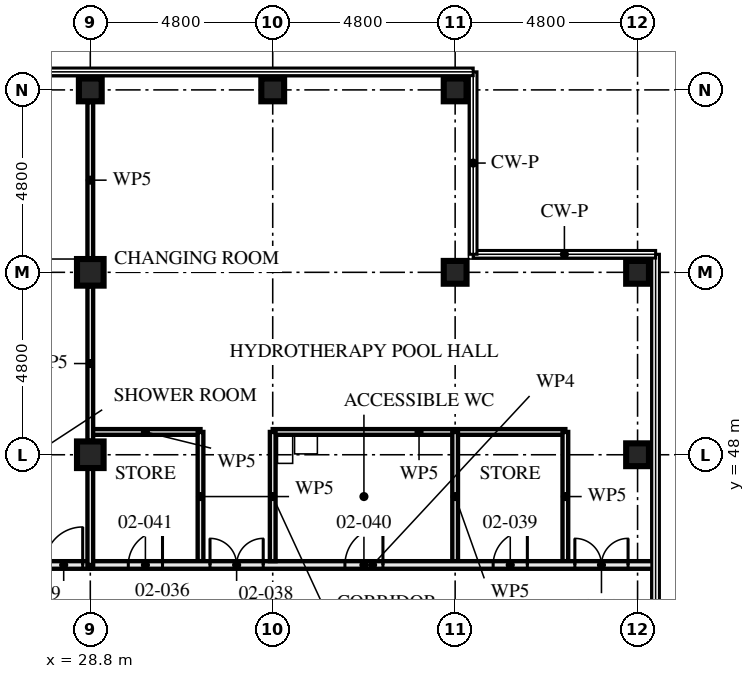
"""IFC4 building model, lengths in metres.
Left out: names, types, materials, properties, quantities, classifications, styles, units other than length and angle.
Written with IfcOpenShell. Run it as: python <this file> out.ifc"""

import sys

from ifc_helpers import new_model, si_unit, direction, frame, frame_2d, origin, origin_2d, place, context, subcontext, project, spatial, rectangle, hollow_rectangle, extrude, element, fill, save


model = new_model("IFC4")
c1 = context("Model", 3, precision=1e-05, world=origin(), true_north=direction((0.0, 1.0)))
c2 = subcontext(c1, "Body", "Model", "MODEL_VIEW")
j1 = project(units=[si_unit("LENGTHUNIT", "METRE"), si_unit("PLANEANGLEUNIT", "RADIAN")], contexts=[c1])
p1 = place(None, origin())
s1 = spatial("IfcSite", under=j1, at=p1, CompositionType="ELEMENT")
p2 = place(p1, origin())
s2 = spatial("IfcBuilding", under=s1, at=p2, CompositionType="ELEMENT")
p3 = place(p2, frame((0.0, 0.0, 9.0)))
s3 = spatial("IfcBuildingStorey", under=s2, at=p3, CompositionType="ELEMENT", Elevation=9.0)
for number, where, z_axis, x_axis in (
    (1, (28.8, 48.0, 0.0), (0.0, 0.0, 1.0), (1.0, 0.0, 0.0)),
    (2, (28.8, 52.8, 0.0), (0.0, 0.0, 1.0), (1.0, 0.0, 0.0)),
):
    element("IfcColumn", number, at=place(p3, frame(where, z_axis=z_axis, x_axis=x_axis)), inside=s3, PredefinedType="COLUMN", context=c2, shape_type="SweptSolid", body=[
        extrude(hollow_rectangle(XDim=0.7, YDim=0.7, WallThickness=0.06, at=origin_2d()), origin(), (0.0, 0.0, 1.0), 4.5),
    ])
for number, where, z_axis, x_axis in (
    (3, (28.8, 57.6, 0.0), (0.0, 0.0, 1.0), (0.0, 1.0, 0.0)),
    (4, (33.6, 57.6, 0.0), (0.0, 0.0, 1.0), (0.0, 1.0, 0.0)),
):
    element("IfcColumn", number, at=place(p3, frame(where, z_axis=z_axis, x_axis=x_axis)), inside=s3, PredefinedType="COLUMN", context=c2, shape_type="SweptSolid", body=[
        extrude(hollow_rectangle(XDim=0.6, YDim=0.6, WallThickness=0.08, at=origin_2d()), origin(), (0.0, 0.0, 1.0), 4.5),
    ])
for number, where, z_axis, x_axis in (
    (5, (38.4, 52.8, 0.0), (0.0, 0.0, 1.0), (0.0, 1.0, 0.0)),
    (6, (38.4, 57.6, 0.0), (0.0, 0.0, 1.0), (0.0, 1.0, 0.0)),
):
    element("IfcColumn", number, at=place(p3, frame(where, z_axis=z_axis, x_axis=x_axis)), inside=s3, PredefinedType="COLUMN", context=c2, shape_type="SweptSolid", body=[
        extrude(hollow_rectangle(XDim=0.6, YDim=0.6, WallThickness=0.06, at=origin_2d()), origin(), (0.0, 0.0, 1.0), 4.5),
    ])
p4 = place(p3, frame((43.2, 48.0, 0.0), z_axis=(0.0, 0.0, 1.0), x_axis=(1.0, 0.0, 0.0)))
e7 = element("IfcColumn", 7, at=p4, inside=s3, PredefinedType="COLUMN", context=c2, shape_type="SweptSolid", body=[
    extrude(hollow_rectangle(XDim=0.6, YDim=0.6, WallThickness=0.08, at=origin_2d()), origin(), (0.0, 0.0, 1.0), 4.5),
])
p5 = place(p3, frame((43.2, 52.8, 0.0), z_axis=(0.0, 0.0, 1.0), x_axis=(0.0, 1.0, 0.0)))
e8 = element("IfcColumn", 8, at=p5, inside=s3, PredefinedType="COLUMN", context=c2, shape_type="SweptSolid", body=[
    extrude(hollow_rectangle(XDim=0.6, YDim=0.6, WallThickness=0.06, at=origin_2d()), origin(), (0.0, 0.0, 1.0), 4.5),
])
p6 = place(p3, frame((28.8, 45.1, 0.0), z_axis=(0.0, 0.0, 1.0), x_axis=(-1.0, 0.0, 0.0)))
e9 = element("IfcWall", 9, at=p6, inside=s3, PredefinedType="PARTITIONING", context=c2, shape_type="SweptSolid", body=[
    extrude(rectangle(XDim=14.4, YDim=0.2, at=frame_2d((7.2, 0.0))), origin(), (0.0, 0.0, 1.0), 4.33),
])
p7 = place(p6, frame((0.2, 0.0, 0.0)))
e10 = element("IfcOpeningElement", 10, at=p7, cuts=e9, PredefinedType="OPENING", context=c2, shape_type="SweptSolid", body=[
    extrude(rectangle(XDim=1.0, YDim=2.4, at=frame_2d((0.5, 1.2))), frame((0.0, 0.111, 0.0), z_axis=(0.0, -1.0, 0.0), x_axis=(1.0, 0.0, 0.0)), (0.0, 0.0, 1.0), 0.221),
])
p8 = place(p6, frame((5.0, 0.0, 0.0)))
e11 = element("IfcOpeningElement", 11, at=p8, cuts=e9, PredefinedType="OPENING", context=c2, shape_type="SweptSolid", body=[
    extrude(rectangle(XDim=1.0, YDim=2.4, at=frame_2d((0.5, 1.2))), frame((0.0, 0.111, 0.0), z_axis=(0.0, -1.0, 0.0), x_axis=(1.0, 0.0, 0.0)), (0.0, 0.0, 1.0), 0.221),
])
p9 = place(p6, frame((9.8, 0.0, 0.0)))
e12 = element("IfcOpeningElement", 12, at=p9, cuts=e9, PredefinedType="OPENING", context=c2, shape_type="SweptSolid", body=[
    extrude(rectangle(XDim=1.0, YDim=2.4, at=frame_2d((0.5, 1.2))), frame((0.0, 0.111, 0.0), z_axis=(0.0, -1.0, 0.0), x_axis=(1.0, 0.0, 0.0)), (0.0, 0.0, 1.0), 0.221),
])
p10 = place(p6, frame((2.65, 0.0, 0.0)))
e13 = element("IfcOpeningElement", 13, at=p10, cuts=e9, PredefinedType="OPENING", context=c2, shape_type="SweptSolid", body=[
    extrude(rectangle(XDim=0.9, YDim=2.1, at=frame_2d((0.45, 1.05))), frame((0.0, 0.111, 0.0), z_axis=(0.0, -1.0, 0.0), x_axis=(1.0, 0.0, 0.0)), (0.0, 0.0, 1.0), 0.221),
])
p11 = place(p6, frame((7.45, 0.0, 0.0)))
e14 = element("IfcOpeningElement", 14, at=p11, cuts=e9, PredefinedType="OPENING", context=c2, shape_type="SweptSolid", body=[
    extrude(rectangle(XDim=0.9, YDim=2.1, at=frame_2d((0.45, 1.05))), frame((0.0, 0.111, 0.0), z_axis=(0.0, -1.0, 0.0), x_axis=(1.0, 0.0, 0.0)), (0.0, 0.0, 1.0), 0.221),
])
p12 = place(p6, frame((12.25, 0.0, 0.0)))
e15 = element("IfcOpeningElement", 15, at=p12, cuts=e9, PredefinedType="OPENING", context=c2, shape_type="SweptSolid", body=[
    extrude(rectangle(XDim=0.9, YDim=2.1, at=frame_2d((0.45, 1.05))), frame((0.0, 0.111, 0.0), z_axis=(0.0, -1.0, 0.0), x_axis=(1.0, 0.0, 0.0)), (0.0, 0.0, 1.0), 0.221),
])
for number, where, z_axis, x_axis in (
    (16, (33.6, 48.6, 0.0), (0.0, 0.0, 1.0), (0.0, -1.0, 0.0)),
    (17, (41.3, 48.6, 0.0), (0.0, 0.0, 1.0), (0.0, -1.0, 0.0)),
):
    element("IfcWall", number, at=place(p3, frame(where, z_axis=z_axis, x_axis=x_axis)), inside=s3, PredefinedType="PARTITIONING", context=c2, shape_type="SweptSolid", body=[
        extrude(rectangle(XDim=3.4, YDim=0.15, at=frame_2d((1.7, 0.0))), origin(), (0.0, 0.0, 1.0), 3.55),
    ])
p13 = place(p3, frame((41.3, 48.6, 0.0), z_axis=(0.0, 0.0, 1.0), x_axis=(-1.0, 0.0, 0.0)))
e18 = element("IfcWall", 18, at=p13, inside=s3, PredefinedType="PARTITIONING", context=c2, shape_type="SweptSolid", body=[
    extrude(rectangle(XDim=7.7, YDim=0.15, at=frame_2d((3.85, 0.0))), origin(), (0.0, 0.0, 1.0), 4.33),
])
for number, where, z_axis, x_axis in (
    (19, (38.4, 48.6, 0.0), (0.0, 0.0, 1.0), (0.0, -1.0, 0.0)),
    (20, (31.7, 48.6, 0.0), (0.0, 0.0, 1.0), (0.0, -1.0, 0.0)),
):
    element("IfcWall", number, at=place(p3, frame(where, z_axis=z_axis, x_axis=x_axis)), inside=s3, PredefinedType="PARTITIONING", context=c2, shape_type="SweptSolid", body=[
        extrude(rectangle(XDim=3.4, YDim=0.15, at=frame_2d((1.7, 0.0))), origin(), (0.0, 0.0, 1.0), 3.55),
    ])
p14 = place(p3, frame((31.7, 48.6, 0.0), z_axis=(0.0, 0.0, 1.0), x_axis=(-1.0, 0.0, 0.0)))
e21 = element("IfcWall", 21, at=p14, inside=s3, PredefinedType="PARTITIONING", context=c2, shape_type="SweptSolid", body=[
    extrude(rectangle(XDim=2.9, YDim=0.15, at=frame_2d((1.45, 0.0))), origin(), (0.0, 0.0, 1.0), 4.33),
])
p15 = place(p3, frame((43.655, 45.1, 0.0), z_axis=(0.0, 0.0, 1.0), x_axis=(-1.0, 0.0, 0.0)))
e22 = element("IfcWall", 22, at=p15, inside=s3, PredefinedType="PARTITIONING", context=c2, shape_type="SweptSolid", body=[
    extrude(rectangle(XDim=14.855, YDim=0.2, at=frame_2d((7.427, 0.0))), origin(), (0.0, 0.0, 1.0), 3.32),
])
p16 = place(p15, frame((0.705, 0.0, 0.0)))
e23 = element("IfcOpeningElement", 23, at=p16, cuts=e22, PredefinedType="OPENING", context=c2, shape_type="SweptSolid", body=[
    extrude(rectangle(XDim=1.4, YDim=2.4, at=frame_2d((0.7, 1.2))), frame((0.0, 0.111, 0.0), z_axis=(0.0, -1.0, 0.0), x_axis=(1.0, 0.0, 0.0)), (0.0, 0.0, 1.0), 0.221),
])
p17 = place(p15, frame((10.305, 0.0, 0.0)))
e24 = element("IfcOpeningElement", 24, at=p17, cuts=e22, PredefinedType="OPENING", context=c2, shape_type="SweptSolid", body=[
    extrude(rectangle(XDim=1.4, YDim=2.4, at=frame_2d((0.7, 1.2))), frame((0.0, 0.111, 0.0), z_axis=(0.0, -1.0, 0.0), x_axis=(1.0, 0.0, 0.0)), (0.0, 0.0, 1.0), 0.221),
])
p18 = place(p15, frame((3.355, 0.0, 0.0)))
e25 = element("IfcOpeningElement", 25, at=p18, cuts=e22, PredefinedType="OPENING", context=c2, shape_type="SweptSolid", body=[
    extrude(rectangle(XDim=0.9, YDim=2.1, at=frame_2d((0.45, 1.05))), frame((0.0, 0.111, 0.0), z_axis=(0.0, -1.0, 0.0), x_axis=(1.0, 0.0, 0.0)), (0.0, 0.0, 1.0), 0.221),
])
p19 = place(p15, frame((7.155, 0.0, 0.0)))
e26 = element("IfcOpeningElement", 26, at=p19, cuts=e22, PredefinedType="OPENING", context=c2, shape_type="SweptSolid", body=[
    extrude(rectangle(XDim=1.0, YDim=2.1, at=frame_2d((0.5, 1.05))), frame((0.0, 0.111, 0.0), z_axis=(0.0, -1.0, 0.0), x_axis=(1.0, 0.0, 0.0)), (0.0, 0.0, 1.0), 0.221),
])
p20 = place(p15, frame((12.955, 0.0, 0.0)))
e27 = element("IfcOpeningElement", 27, at=p20, cuts=e22, PredefinedType="OPENING", context=c2, shape_type="SweptSolid", body=[
    extrude(rectangle(XDim=0.9, YDim=2.1, at=frame_2d((0.45, 1.05))), frame((0.0, 0.111, 0.0), z_axis=(0.0, -1.0, 0.0), x_axis=(1.0, 0.0, 0.0)), (0.0, 0.0, 1.0), 0.221),
])
p21 = place(p3, frame((28.8, 45.1, 0.0), z_axis=(0.0, 0.0, 1.0), x_axis=(0.0, 1.0, 0.0)))
e28 = element("IfcWall", 28, at=p21, inside=s3, PredefinedType="PARTITIONING", context=c2, shape_type="SweptSolid", body=[
    extrude(rectangle(XDim=2.53, YDim=0.15, at=frame_2d((1.265, 0.0))), origin(), (0.0, 0.0, 1.0), 3.32),
])
p22 = place(p3, frame((28.8, 48.37, 0.0), z_axis=(0.0, 0.0, 1.0), x_axis=(0.0, 1.0, 0.0)))
e29 = element("IfcWall", 29, at=p22, inside=s3, PredefinedType="PARTITIONING", context=c2, shape_type="SweptSolid", body=[
    extrude(rectangle(XDim=4.06, YDim=0.15, at=frame_2d((2.03, 0.0))), origin(), (0.0, 0.0, 1.0), 3.32),
])
p23 = place(p3, frame((28.8, 53.17, 0.0), z_axis=(0.0, 0.0, 1.0), x_axis=(0.0, 1.0, 0.0)))
e30 = element("IfcWall", 30, at=p23, inside=s3, PredefinedType="PARTITIONING", context=c2, shape_type="SweptSolid", body=[
    extrude(rectangle(XDim=4.11, YDim=0.15, at=frame_2d((2.055, 0.0))), origin(), (0.0, 0.0, 1.0), 3.32),
])
p24 = place(p7, frame((1.0, 0.0, 0.0), z_axis=(0.0, 0.0, 1.0), x_axis=(-1.0, 0.0, 0.0)))
e31 = element("IfcDoor", 31, at=p24, inside=s3, OperationType="SINGLE_SWING_LEFT", PredefinedType="DOOR", context=c2, shape_type="SweptSolid", body=[
    extrude(rectangle(XDim=1.0, YDim=2.4, at=frame_2d((0.5, 1.2))), frame((0.0, 0.027, 0.0), z_axis=(0.0, -1.0, 0.0), x_axis=(1.0, 0.0, 0.0)), (0.0, 0.0, 1.0), 0.054),
])
fill(e10, e31)
p25 = place(p16, frame((1.4, 0.0, 0.0), z_axis=(0.0, 0.0, 1.0), x_axis=(-1.0, 0.0, 0.0)))
e32 = element("IfcDoor", 32, at=p25, inside=s3, OperationType="DOUBLE_DOOR_SINGLE_SWING", PredefinedType="DOOR", context=c2, shape_type="SweptSolid", body=[
    extrude(rectangle(XDim=1.4, YDim=2.4, at=frame_2d((0.7, 1.2))), frame((0.0, 0.027, 0.0), z_axis=(0.0, -1.0, 0.0), x_axis=(1.0, 0.0, 0.0)), (0.0, 0.0, 1.0), 0.054),
])
fill(e23, e32)
p26 = place(p17, frame((1.4, 0.0, 0.0), z_axis=(0.0, 0.0, 1.0), x_axis=(-1.0, 0.0, 0.0)))
e33 = element("IfcDoor", 33, at=p26, inside=s3, OperationType="DOUBLE_DOOR_SINGLE_SWING", PredefinedType="DOOR", context=c2, shape_type="SweptSolid", body=[
    extrude(rectangle(XDim=1.4, YDim=2.4, at=frame_2d((0.7, 1.2))), frame((0.0, 0.027, 0.0), z_axis=(0.0, -1.0, 0.0), x_axis=(1.0, 0.0, 0.0)), (0.0, 0.0, 1.0), 0.054),
])
fill(e24, e33)
p27 = place(p18, frame((0.9, 0.0, 0.0), z_axis=(0.0, 0.0, 1.0), x_axis=(-1.0, 0.0, 0.0)))
e34 = element("IfcDoor", 34, at=p27, inside=s3, OperationType="SINGLE_SWING_LEFT", PredefinedType="DOOR", context=c2, shape_type="SweptSolid", body=[
    extrude(rectangle(XDim=0.9, YDim=2.1, at=frame_2d((0.45, 1.05))), frame((0.0, 0.027, 0.0), z_axis=(0.0, -1.0, 0.0), x_axis=(1.0, 0.0, 0.0)), (0.0, 0.0, 1.0), 0.054),
])
fill(e25, e34)
p28 = place(p19, frame((1.0, 0.0, 0.0), z_axis=(0.0, 0.0, 1.0), x_axis=(-1.0, 0.0, 0.0)))
e35 = element("IfcDoor", 35, at=p28, inside=s3, OperationType="SINGLE_SWING_LEFT", PredefinedType="DOOR", context=c2, shape_type="SweptSolid", body=[
    extrude(rectangle(XDim=1.0, YDim=2.1, at=frame_2d((0.5, 1.05))), frame((0.0, 0.027, 0.0), z_axis=(0.0, -1.0, 0.0), x_axis=(1.0, 0.0, 0.0)), (0.0, 0.0, 1.0), 0.054),
])
fill(e26, e35)
p29 = place(p20, frame((0.9, 0.0, 0.0), z_axis=(0.0, 0.0, 1.0), x_axis=(-1.0, 0.0, 0.0)))
e36 = element("IfcDoor", 36, at=p29, inside=s3, OperationType="SINGLE_SWING_LEFT", PredefinedType="DOOR", context=c2, shape_type="SweptSolid", body=[
    extrude(rectangle(XDim=0.9, YDim=2.1, at=frame_2d((0.45, 1.05))), frame((0.0, 0.027, 0.0), z_axis=(0.0, -1.0, 0.0), x_axis=(1.0, 0.0, 0.0)), (0.0, 0.0, 1.0), 0.054),
])
fill(e27, e36)
save(model, sys.argv[1])
